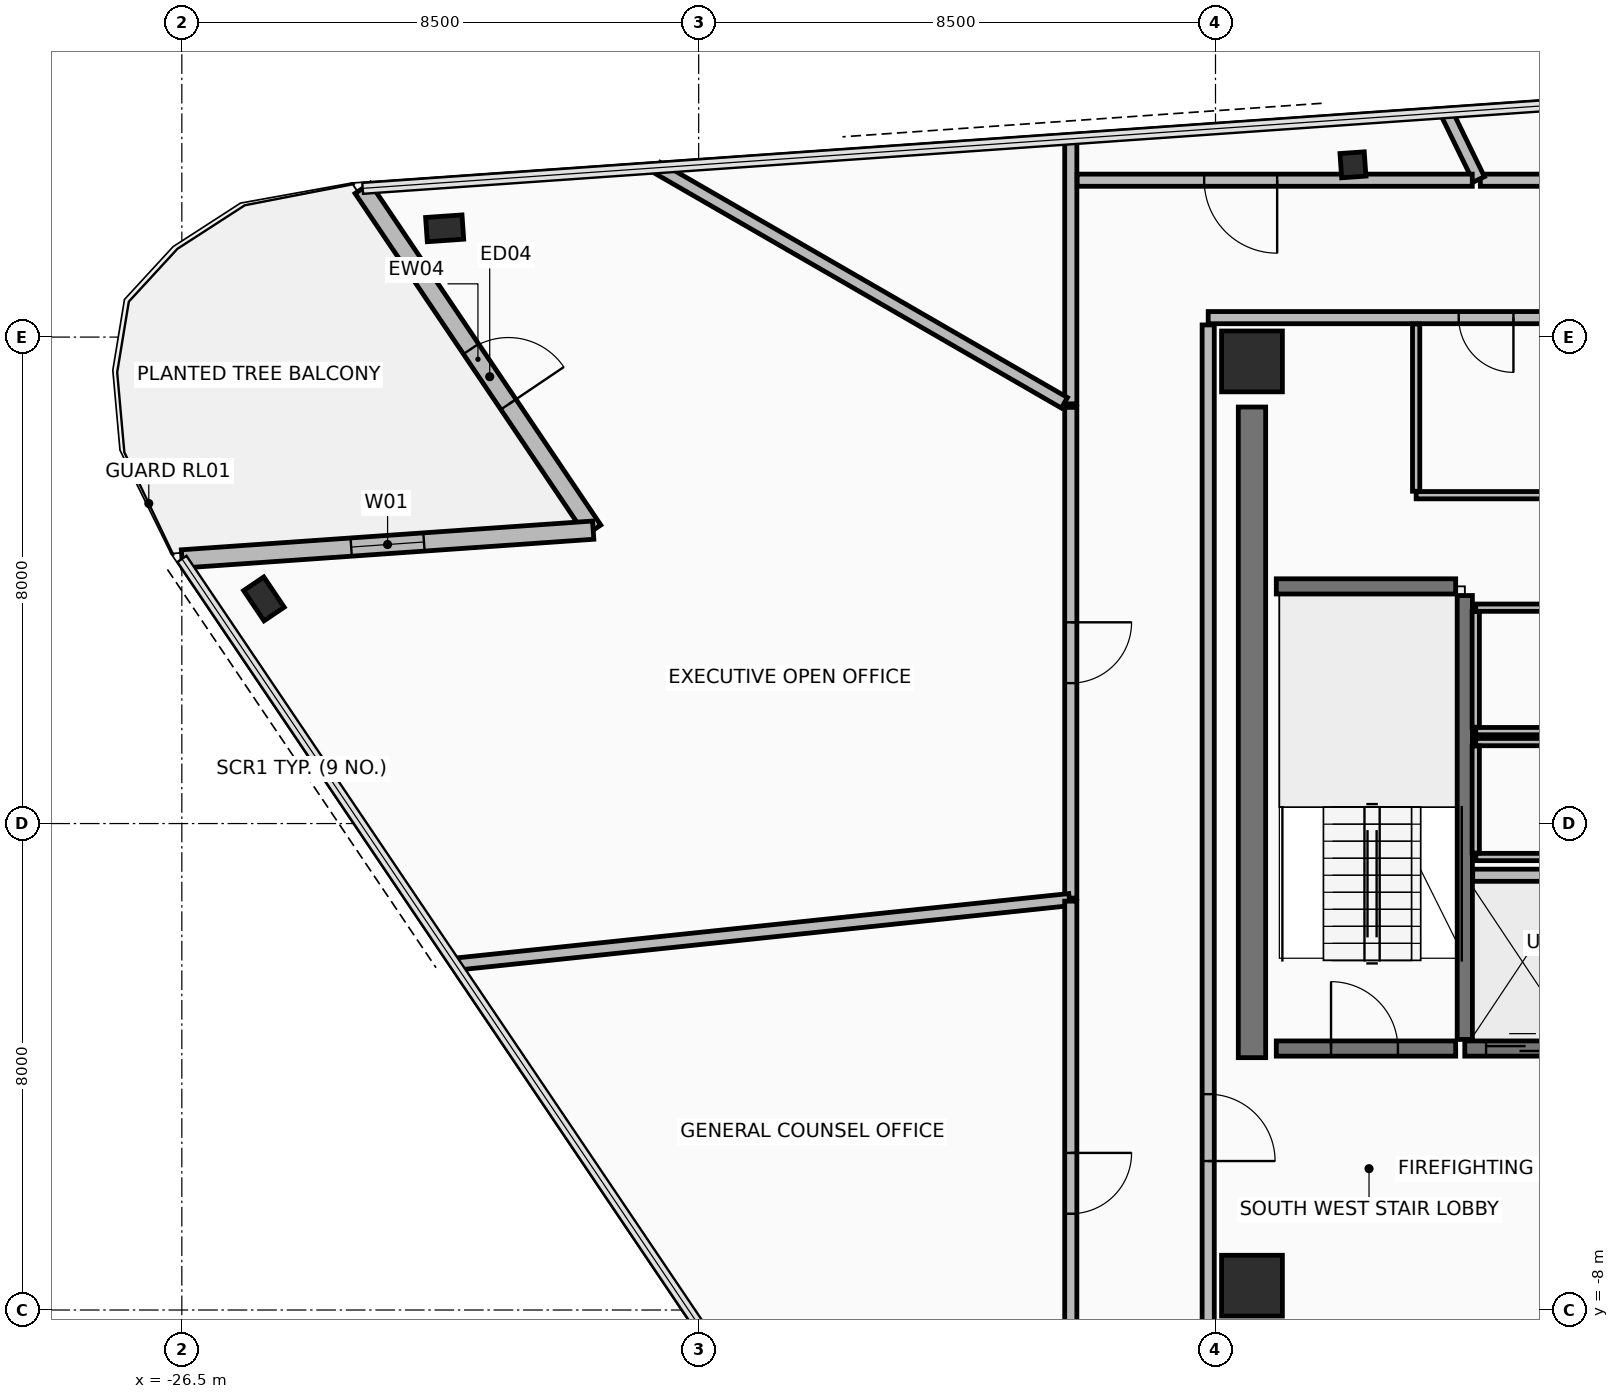
"""IFC4 building model, lengths in metres.
Left out: names, types, materials, properties, quantities, classifications, styles, units other than length and angle.
Written with IfcOpenShell. Run it as: python <this file> out.ifc"""

import sys

from ifc_helpers import new_model, si_unit, direction, frame, frame_2d, origin, origin_2d, place, context, subcontext, project, spatial, rectangle, hollow_rectangle, extrude, element, fill, save


model = new_model("IFC4")
c1 = context("Model", 3, precision=1e-05, world=origin(), true_north=direction((0.0, 1.0)))
c2 = subcontext(c1, "Body", "Model", "MODEL_VIEW")
j1 = project(units=[si_unit("LENGTHUNIT", "METRE"), si_unit("PLANEANGLEUNIT", "RADIAN")], contexts=[c1])
p1 = place(None, origin())
s1 = spatial("IfcSite", under=j1, at=p1, CompositionType="ELEMENT")
p2 = place(p1, origin())
s2 = spatial("IfcBuilding", under=s1, at=p2, CompositionType="ELEMENT")
p3 = place(p2, frame((0.0, 0.0, 260.6)))
s3 = spatial("IfcBuildingStorey", under=s2, at=p3, CompositionType="ELEMENT", Elevation=260.6)
for number, where, z_axis, x_axis in (
    (1, (-8.9, -7.6, 0.0), (0.0, 0.0, 1.0), (1.0, 0.0, 0.0)),
    (2, (-8.9, 7.6, 0.0), (0.0, 0.0, 1.0), (1.0, 0.0, 0.0)),
):
    element("IfcColumn", number, at=place(p3, frame(where, z_axis=z_axis, x_axis=x_axis)), inside=s3, PredefinedType="COLUMN", context=c2, shape_type="SweptSolid", body=[
        extrude(rectangle(XDim=1.0, YDim=1.0, at=origin_2d()), origin(), (0.0, 0.0, 1.0), 3.6),
    ])
p4 = place(p3, frame((-25.15, 3.695, 0.0), z_axis=(0.0, 0.0, 1.0), x_axis=(-0.559192903471, 0.829037572555, 0.0)))
e3 = element("IfcColumn", 3, at=p4, inside=s3, PredefinedType="COLUMN", context=c2, shape_type="SweptSolid", body=[
    extrude(hollow_rectangle(XDim=0.4, YDim=0.6, WallThickness=0.03, at=origin_2d()), origin(), (0.0, 0.0, 1.0), 3.6),
])
p5 = place(p3, frame((-7.24, 10.833, 0.0), z_axis=(0.0, 0.0, 1.0), x_axis=(0.99756392851, 0.069758214822, 0.0)))
e4 = element("IfcColumn", 4, at=p5, inside=s3, PredefinedType="COLUMN", context=c2, shape_type="SweptSolid", body=[
    extrude(hollow_rectangle(XDim=0.4, YDim=0.4, WallThickness=0.025, at=origin_2d()), origin(), (0.0, 0.0, 1.0), 3.6),
])
p6 = place(p3, frame((-22.177, 9.789, 0.0), z_axis=(0.0, 0.0, 1.0), x_axis=(0.99756392851, 0.069758214822, 0.0)))
e5 = element("IfcColumn", 5, at=p6, inside=s3, PredefinedType="COLUMN", context=c2, shape_type="SweptSolid", body=[
    extrude(hollow_rectangle(XDim=0.4, YDim=0.6, WallThickness=0.03, at=origin_2d()), origin(), (0.0, 0.0, 1.0), 3.6),
])
p7 = place(p3, frame((-23.526, 10.446, 0.0), z_axis=(0.0, 0.0, 1.0), x_axis=(0.559187716425, -0.829041071238, 0.0)))
e6 = element("IfcWall", 6, at=p7, inside=s3, PredefinedType="STANDARD", context=c2, shape_type="SweptSolid", body=[
    extrude(rectangle(XDim=6.78, YDim=0.3, at=frame_2d((3.39, 0.0))), origin(), (0.0, 0.0, 1.0), 2.765),
])
p8 = place(p7, frame((3.186, 0.0, 0.0)))
e7 = element("IfcOpeningElement", 7, at=p8, cuts=e6, PredefinedType="OPENING", context=c2, shape_type="SweptSolid", body=[
    extrude(rectangle(XDim=1.1, YDim=2.2, at=frame_2d((0.55, 1.1))), frame((0.0, 0.16, 0.0), z_axis=(0.0, -1.0, 0.0), x_axis=(1.0, 0.0, 0.0)), (0.0, 0.0, 1.0), 0.32),
])
p9 = place(p3, frame((-19.735, 4.825, 0.0), z_axis=(0.0, 0.0, 1.0), x_axis=(-0.997564507468, -0.06974993506, 0.0)))
e8 = element("IfcWall", 8, at=p9, inside=s3, PredefinedType="STANDARD", context=c2, shape_type="SweptSolid", body=[
    extrude(rectangle(XDim=6.78, YDim=0.3, at=frame_2d((3.39, 0.0))), origin(), (0.0, 0.0, 1.0), 2.765),
])
p10 = place(p9, frame((2.79, 0.0, 0.485)))
e9 = element("IfcOpeningElement", 9, at=p10, cuts=e8, PredefinedType="OPENING", context=c2, shape_type="SweptSolid", body=[
    extrude(rectangle(XDim=1.2, YDim=2.1, at=frame_2d((0.6, 1.05))), frame((0.0, 0.16, 0.0), z_axis=(0.0, -1.0, 0.0), x_axis=(1.0, 0.0, 0.0)), (0.0, 0.0, 1.0), 0.32),
])
p11 = place(p3, frame((-8.9, -3.85, 0.0), z_axis=(0.0, 0.0, 1.0), x_axis=(0.0, 1.0, 0.0)))
e10 = element("IfcWall", 10, at=p11, inside=s3, PredefinedType="SHEAR", context=c2, shape_type="SweptSolid", body=[
    extrude(rectangle(XDim=10.7, YDim=0.45, at=frame_2d((5.35, 0.0))), origin(), (0.0, 0.0, 1.0), 3.42),
])
p12 = place(p3, frame((9.62, 8.32, 0.0), z_axis=(0.0, 0.0, 1.0), x_axis=(-1.0, 0.0, 0.0)))
e11 = element("IfcWall", 11, at=p12, inside=s3, PredefinedType="PARTITIONING", context=c2, shape_type="SweptSolid", body=[
    extrude(rectangle(XDim=19.24, YDim=0.2, at=frame_2d((9.62, 0.0))), origin(), (0.0, 0.0, 1.0), 2.915),
])
p13 = place(p12, frame((8.67, 0.0, 0.0)))
e12 = element("IfcOpeningElement", 12, at=p13, cuts=e11, PredefinedType="OPENING", context=c2, shape_type="SweptSolid", body=[
    extrude(rectangle(XDim=0.9, YDim=2.1, at=frame_2d((0.45, 1.05))), frame((0.0, 0.11, 0.0), z_axis=(0.0, -1.0, 0.0), x_axis=(1.0, 0.0, 0.0)), (0.0, 0.0, 1.0), 0.22),
])
p14 = place(p12, frame((14.22, 0.0, 0.0)))
e13 = element("IfcOpeningElement", 13, at=p14, cuts=e11, PredefinedType="OPENING", context=c2, shape_type="SweptSolid", body=[
    extrude(rectangle(XDim=0.9, YDim=2.1, at=frame_2d((0.45, 1.05))), frame((0.0, 0.11, 0.0), z_axis=(0.0, -1.0, 0.0), x_axis=(1.0, 0.0, 0.0)), (0.0, 0.0, 1.0), 0.22),
])
p15 = place(p3, frame((-9.62, 8.2, 0.0), z_axis=(0.0, 0.0, 1.0), x_axis=(0.0, -1.0, 0.0)))
e14 = element("IfcWall", 14, at=p15, inside=s3, PredefinedType="PARTITIONING", context=c2, shape_type="SweptSolid", body=[
    extrude(rectangle(XDim=16.4, YDim=0.2, at=frame_2d((8.2, 0.0))), origin(), (0.0, 0.0, 1.0), 2.765),
])
p16 = place(p15, frame((12.65, 0.0, 0.0)))
e15 = element("IfcOpeningElement", 15, at=p16, cuts=e14, PredefinedType="OPENING", context=c2, shape_type="SweptSolid", body=[
    extrude(rectangle(XDim=1.1, YDim=2.15, at=frame_2d((0.55, 1.075))), frame((0.0, 0.11, 0.0), z_axis=(0.0, -1.0, 0.0), x_axis=(1.0, 0.0, 0.0)), (0.0, 0.0, 1.0), 0.22),
])
p17 = place(p3, frame((-5.4, -3.55, 0.0), z_axis=(0.0, 0.0, 1.0), x_axis=(0.0, 1.0, 0.0)))
e16 = element("IfcWall", 16, at=p17, inside=s3, PredefinedType="SHEAR", context=c2, shape_type="SweptSolid", body=[
    extrude(rectangle(XDim=7.3, YDim=0.25, at=frame_2d((3.65, 0.0))), origin(), (0.0, 0.0, 1.0), 3.42),
])
p18 = place(p3, frame((-8.5, -3.7, 0.0), z_axis=(0.0, 0.0, 1.0), x_axis=(1.0, 0.0, 0.0)))
e17 = element("IfcWall", 17, at=p18, inside=s3, PredefinedType="SHEAR", context=c2, shape_type="SweptSolid", body=[
    extrude(rectangle(XDim=2.95, YDim=0.25, at=frame_2d((1.475, 0.0))), origin(), (0.0, 0.0, 1.0), 3.42),
])
p19 = place(p18, frame((0.9, 0.0, 0.0)))
e18 = element("IfcOpeningElement", 18, at=p19, cuts=e17, PredefinedType="OPENING", context=c2, shape_type="SweptSolid", body=[
    extrude(rectangle(XDim=1.1, YDim=2.15, at=frame_2d((0.55, 1.075))), frame((0.0, 0.135, 0.0), z_axis=(0.0, -1.0, 0.0), x_axis=(1.0, 0.0, 0.0)), (0.0, 0.0, 1.0), 0.27),
])
p20 = place(p3, frame((-8.5, 3.9, 0.0), z_axis=(0.0, 0.0, 1.0), x_axis=(1.0, 0.0, 0.0)))
e19 = element("IfcWall", 19, at=p20, inside=s3, PredefinedType="SHEAR", context=c2, shape_type="SweptSolid", body=[
    extrude(rectangle(XDim=2.95, YDim=0.25, at=frame_2d((1.475, 0.0))), origin(), (0.0, 0.0, 1.0), 3.42),
])
p21 = place(p3, frame((-5.4, -3.7, 0.0), z_axis=(0.0, 0.0, 1.0), x_axis=(1.0, 0.0, 0.0)))
e20 = element("IfcWall", 20, at=p21, inside=s3, PredefinedType="SHEAR", context=c2, shape_type="SweptSolid", body=[
    extrude(rectangle(XDim=1.9, YDim=0.25, at=frame_2d((0.95, 0.0))), origin(), (0.0, 0.0, 1.0), 3.42),
])
p22 = place(p21, frame((0.35, 0.0, 0.0)))
e21 = element("IfcOpeningElement", 21, at=p22, cuts=e20, PredefinedType="OPENING", context=c2, shape_type="SweptSolid", body=[
    extrude(rectangle(XDim=1.2, YDim=2.2, at=frame_2d((0.6, 1.1))), frame((0.0, 0.135, 0.0), z_axis=(0.0, -1.0, 0.0), x_axis=(1.0, 0.0, 0.0)), (0.0, 0.0, 1.0), 0.27),
])
p23 = place(p3, frame((-5.27, -0.85, 0.0), z_axis=(0.0, 0.0, 1.0), x_axis=(1.0, 0.0, 0.0)))
e22 = element("IfcWall", 22, at=p23, inside=s3, PredefinedType="PARTITIONING", context=c2, shape_type="SweptSolid", body=[
    extrude(rectangle(XDim=1.77, YDim=0.2, at=frame_2d((0.885, 0.0))), origin(), (0.0, 0.0, 1.0), 3.42),
])
p24 = place(p3, frame((-5.22, 1.52, 0.0), z_axis=(0.0, 0.0, 1.0), x_axis=(1.0, 0.0, 0.0)))
e23 = element("IfcWall", 23, at=p24, inside=s3, PredefinedType="PARTITIONING", context=c2, shape_type="SweptSolid", body=[
    extrude(rectangle(XDim=3.47, YDim=0.12, at=frame_2d((1.735, 0.0))), origin(), (0.0, 0.0, 1.0), 3.42),
])
p25 = place(p3, frame((-1.815, 3.55, 0.0), z_axis=(0.0, 0.0, 1.0), x_axis=(-1.0, 0.0, 0.0)))
e24 = element("IfcWall", 24, at=p25, inside=s3, PredefinedType="PARTITIONING", context=c2, shape_type="SweptSolid", body=[
    extrude(rectangle(XDim=3.405, YDim=0.12, at=frame_2d((1.703, 0.0))), origin(), (0.0, 0.0, 1.0), 3.42),
])
p26 = place(p3, frame((-5.22, 3.485, 0.0), z_axis=(0.0, 0.0, 1.0), x_axis=(0.0, -1.0, 0.0)))
e25 = element("IfcWall", 25, at=p26, inside=s3, PredefinedType="PARTITIONING", context=c2, shape_type="SweptSolid", body=[
    extrude(rectangle(XDim=1.9, YDim=0.12, at=frame_2d((0.95, 0.0))), origin(), (0.0, 0.0, 1.0), 3.42),
])
p27 = place(p3, frame((-5.22, -0.55, 0.0), z_axis=(0.0, 0.0, 1.0), x_axis=(1.0, 0.0, 0.0)))
e26 = element("IfcWall", 26, at=p27, inside=s3, PredefinedType="PARTITIONING", context=c2, shape_type="SweptSolid", body=[
    extrude(rectangle(XDim=3.47, YDim=0.12, at=frame_2d((1.735, 0.0))), origin(), (0.0, 0.0, 1.0), 3.42),
])
p28 = place(p3, frame((-1.815, 1.34, 0.0), z_axis=(0.0, 0.0, 1.0), x_axis=(-1.0, 0.0, 0.0)))
e27 = element("IfcWall", 27, at=p28, inside=s3, PredefinedType="PARTITIONING", context=c2, shape_type="SweptSolid", body=[
    extrude(rectangle(XDim=3.405, YDim=0.12, at=frame_2d((1.703, 0.0))), origin(), (0.0, 0.0, 1.0), 3.42),
])
p29 = place(p3, frame((-5.22, 1.275, 0.0), z_axis=(0.0, 0.0, 1.0), x_axis=(0.0, -1.0, 0.0)))
e28 = element("IfcWall", 28, at=p29, inside=s3, PredefinedType="PARTITIONING", context=c2, shape_type="SweptSolid", body=[
    extrude(rectangle(XDim=1.76, YDim=0.12, at=frame_2d((0.88, 0.0))), origin(), (0.0, 0.0, 1.0), 3.42),
])
p30 = place(p3, frame((-6.2, 5.4, 0.0), z_axis=(0.0, 0.0, 1.0), x_axis=(1.0, 0.0, 0.0)))
e29 = element("IfcWall", 29, at=p30, inside=s3, PredefinedType="PARTITIONING", context=c2, shape_type="SweptSolid", body=[
    extrude(rectangle(XDim=2.3, YDim=0.12, at=frame_2d((1.15, 0.0))), origin(), (0.0, 0.0, 1.0), 3.42),
])
p31 = place(p3, frame((-6.2, 8.215, 0.0), z_axis=(0.0, 0.0, 1.0), x_axis=(0.0, -1.0, 0.0)))
e30 = element("IfcWall", 30, at=p31, inside=s3, PredefinedType="PARTITIONING", context=c2, shape_type="SweptSolid", body=[
    extrude(rectangle(XDim=2.75, YDim=0.12, at=frame_2d((1.375, 0.0))), origin(), (0.0, 0.0, 1.0), 2.715),
])
p32 = place(p3, frame((1.465, 10.58, 0.0), z_axis=(0.0, 0.0, 1.0), x_axis=(-1.0, 0.0, 0.0)))
e31 = element("IfcWall", 31, at=p32, inside=s3, PredefinedType="PARTITIONING", context=c2, shape_type="SweptSolid", body=[
    extrude(rectangle(XDim=6.61, YDim=0.2, at=frame_2d((3.305, 0.0))), origin(), (0.0, 0.0, 1.0), 3.42),
])
p33 = place(p32, frame((2.705, 0.0, 0.0)))
e32 = element("IfcOpeningElement", 32, at=p33, cuts=e31, PredefinedType="OPENING", context=c2, shape_type="SweptSolid", body=[
    extrude(rectangle(XDim=1.2, YDim=2.15, at=frame_2d((0.6, 1.075))), frame((0.0, 0.11, 0.0), z_axis=(0.0, -1.0, 0.0), x_axis=(1.0, 0.0, 0.0)), (0.0, 0.0, 1.0), 0.22),
])
p34 = place(p3, frame((-5.167, 10.594, 0.0), z_axis=(0.0, 0.0, 1.0), x_axis=(-0.438482667622, 0.89873964539, 0.0)))
e33 = element("IfcWall", 33, at=p34, inside=s3, PredefinedType="PARTITIONING", context=c2, shape_type="SweptSolid", body=[
    extrude(rectangle(XDim=1.222, YDim=0.2, at=frame_2d((0.611, 0.0))), origin(), (0.0, 0.0, 1.0), 2.765),
])
p35 = place(p3, frame((-11.88, 11.26, 0.0), z_axis=(0.0, 0.0, 1.0), x_axis=(0.0, -1.0, 0.0)))
e34 = element("IfcWall", 34, at=p35, inside=s3, PredefinedType="PARTITIONING", context=c2, shape_type="SweptSolid", body=[
    extrude(rectangle(XDim=4.358, YDim=0.2, at=frame_2d((2.179, 0.0))), origin(), (0.0, 0.0, 1.0), 2.765),
])
p36 = place(p3, frame((-11.985, 6.92, 0.0), z_axis=(0.0, 0.0, 1.0), x_axis=(-0.866026758741, 0.499997653139, 0.0)))
e35 = element("IfcWall", 35, at=p36, inside=s3, PredefinedType="PARTITIONING", context=c2, shape_type="SweptSolid", body=[
    extrude(rectangle(XDim=7.73, YDim=0.2, at=frame_2d((3.865, 0.0))), origin(), (0.0, 0.0, 1.0), 2.765),
])
p37 = place(p3, frame((-5.277, 10.58, 0.0), z_axis=(0.0, 0.0, 1.0), x_axis=(-1.0, 0.0, 0.0)))
e36 = element("IfcWall", 36, at=p37, inside=s3, PredefinedType="PARTITIONING", context=c2, shape_type="SweptSolid", body=[
    extrude(rectangle(XDim=6.498, YDim=0.2, at=frame_2d((3.249, 0.0))), origin(), (0.0, 0.0, 1.0), 2.765),
])
p38 = place(p37, frame((3.209, 0.0, 0.0)))
e37 = element("IfcOpeningElement", 37, at=p38, cuts=e36, PredefinedType="OPENING", context=c2, shape_type="SweptSolid", body=[
    extrude(rectangle(XDim=1.2, YDim=2.15, at=frame_2d((0.6, 1.075))), frame((0.0, 0.11, 0.0), z_axis=(0.0, -1.0, 0.0), x_axis=(1.0, 0.0, 0.0)), (0.0, 0.0, 1.0), 0.22),
])
p39 = place(p3, frame((-11.88, 6.844, 0.0), z_axis=(0.0, 0.0, 1.0), x_axis=(0.0, -1.0, 0.0)))
e38 = element("IfcWall", 38, at=p39, inside=s3, PredefinedType="PARTITIONING", context=c2, shape_type="SweptSolid", body=[
    extrude(rectangle(XDim=8.071, YDim=0.2, at=frame_2d((4.035, 0.0))), origin(), (0.0, 0.0, 1.0), 2.915),
])
p40 = place(p39, frame((3.535, 0.0, 0.0)))
e39 = element("IfcOpeningElement", 39, at=p40, cuts=e38, PredefinedType="OPENING", context=c2, shape_type="SweptSolid", body=[
    extrude(rectangle(XDim=1.0, YDim=2.15, at=frame_2d((0.5, 1.075))), frame((0.0, 0.11, 0.0), z_axis=(0.0, -1.0, 0.0), x_axis=(1.0, 0.0, 0.0)), (0.0, 0.0, 1.0), 0.22),
])
p41 = place(p3, frame((-11.902, -1.251, 0.0), z_axis=(0.0, 0.0, 1.0), x_axis=(-0.994521271801, -0.104534395947, 0.0)))
e40 = element("IfcWall", 40, at=p41, inside=s3, PredefinedType="PARTITIONING", context=c2, shape_type="SweptSolid", body=[
    extrude(rectangle(XDim=10.141, YDim=0.2, at=frame_2d((5.07, 0.0))), origin(), (0.0, 0.0, 1.0), 2.765),
])
p42 = place(p3, frame((-11.88, -1.276, 0.0), z_axis=(0.0, 0.0, 1.0), x_axis=(0.0, -1.0, 0.0)))
e41 = element("IfcWall", 41, at=p42, inside=s3, PredefinedType="PARTITIONING", context=c2, shape_type="SweptSolid", body=[
    extrude(rectangle(XDim=9.279, YDim=0.2, at=frame_2d((4.64, 0.0))), origin(), (0.0, 0.0, 1.0), 2.915),
])
p43 = place(p42, frame((4.14, 0.0, 0.0)))
e42 = element("IfcOpeningElement", 42, at=p43, cuts=e41, PredefinedType="OPENING", context=c2, shape_type="SweptSolid", body=[
    extrude(rectangle(XDim=1.0, YDim=2.15, at=frame_2d((0.5, 1.075))), frame((0.0, 0.11, 0.0), z_axis=(0.0, -1.0, 0.0), x_axis=(1.0, 0.0, 0.0)), (0.0, 0.0, 1.0), 0.22),
])
p44 = place(p8, frame((1.1, 0.0, 0.0), z_axis=(0.0, 0.0, 1.0), x_axis=(-1.0, 0.0, 0.0)))
e43 = element("IfcDoor", 43, at=p44, inside=s3, OperationType="SINGLE_SWING_LEFT", PredefinedType="DOOR", context=c2, shape_type="SweptSolid", body=[
    extrude(rectangle(XDim=1.1, YDim=2.2, at=frame_2d((0.55, 1.1))), frame((0.0, 0.025, 0.0), z_axis=(0.0, -1.0, 0.0), x_axis=(1.0, 0.0, 0.0)), (0.0, 0.0, 1.0), 0.05),
])
fill(e7, e43)
p45 = place(p10, origin())
e44 = element("IfcWindow", 44, at=p45, inside=s3, PartitioningType="SINGLE_PANEL", PredefinedType="WINDOW", context=c2, shape_type="SweptSolid", body=[
    extrude(rectangle(XDim=1.2, YDim=2.1, at=frame_2d((0.6, 1.05))), frame((0.0, 0.03, 0.0), z_axis=(0.0, -1.0, 0.0), x_axis=(1.0, 0.0, 0.0)), (0.0, 0.0, 1.0), 0.06),
])
fill(e9, e44)
p46 = place(p16, frame((1.1, 0.0, 0.0), z_axis=(0.0, 0.0, 1.0), x_axis=(-1.0, 0.0, 0.0)))
e45 = element("IfcDoor", 45, at=p46, inside=s3, OperationType="SINGLE_SWING_LEFT", PredefinedType="DOOR", context=c2, shape_type="SweptSolid", body=[
    extrude(rectangle(XDim=1.1, YDim=2.15, at=frame_2d((0.55, 1.075))), frame((0.0, 0.025, 0.0), z_axis=(0.0, -1.0, 0.0), x_axis=(1.0, 0.0, 0.0)), (0.0, 0.0, 1.0), 0.05),
])
fill(e15, e45)
p47 = place(p19, origin())
e46 = element("IfcDoor", 46, at=p47, inside=s3, OperationType="SINGLE_SWING_LEFT", PredefinedType="DOOR", context=c2, shape_type="SweptSolid", body=[
    extrude(rectangle(XDim=1.1, YDim=2.15, at=frame_2d((0.55, 1.075))), frame((0.0, 0.025, 0.0), z_axis=(0.0, -1.0, 0.0), x_axis=(1.0, 0.0, 0.0)), (0.0, 0.0, 1.0), 0.05),
])
fill(e18, e46)
p48 = place(p22, origin())
e47 = element("IfcDoor", 47, at=p48, inside=s3, OperationType="SLIDING_TO_RIGHT", PredefinedType="DOOR", context=c2, shape_type="SweptSolid", body=[
    extrude(rectangle(XDim=1.2, YDim=2.2, at=frame_2d((0.6, 1.1))), frame((0.0, 0.025, 0.0), z_axis=(0.0, -1.0, 0.0), x_axis=(1.0, 0.0, 0.0)), (0.0, 0.0, 1.0), 0.05),
])
fill(e21, e47)
p49 = place(p14, origin())
e48 = element("IfcDoor", 48, at=p49, inside=s3, OperationType="SINGLE_SWING_LEFT", PredefinedType="DOOR", context=c2, shape_type="SweptSolid", body=[
    extrude(rectangle(XDim=0.9, YDim=2.1, at=frame_2d((0.45, 1.05))), frame((0.0, 0.025, 0.0), z_axis=(0.0, -1.0, 0.0), x_axis=(1.0, 0.0, 0.0)), (0.0, 0.0, 1.0), 0.05),
])
fill(e13, e48)
p50 = place(p38, origin())
e49 = element("IfcDoor", 49, at=p50, inside=s3, OperationType="SINGLE_SWING_LEFT", PredefinedType="DOOR", context=c2, shape_type="SweptSolid", body=[
    extrude(rectangle(XDim=1.2, YDim=2.15, at=frame_2d((0.6, 1.075))), frame((0.0, 0.025, 0.0), z_axis=(0.0, -1.0, 0.0), x_axis=(1.0, 0.0, 0.0)), (0.0, 0.0, 1.0), 0.05),
])
fill(e37, e49)
p51 = place(p40, origin())
e50 = element("IfcDoor", 50, at=p51, inside=s3, OperationType="SINGLE_SWING_RIGHT", PredefinedType="DOOR", context=c2, shape_type="SweptSolid", body=[
    extrude(rectangle(XDim=1.0, YDim=2.15, at=frame_2d((0.5, 1.075))), frame((0.0, 0.025, 0.0), z_axis=(0.0, -1.0, 0.0), x_axis=(1.0, 0.0, 0.0)), (0.0, 0.0, 1.0), 0.05),
])
fill(e39, e50)
p52 = place(p43, origin())
e51 = element("IfcDoor", 51, at=p52, inside=s3, OperationType="SINGLE_SWING_RIGHT", PredefinedType="DOOR", context=c2, shape_type="SweptSolid", body=[
    extrude(rectangle(XDim=1.0, YDim=2.15, at=frame_2d((0.5, 1.075))), frame((0.0, 0.025, 0.0), z_axis=(0.0, -1.0, 0.0), x_axis=(1.0, 0.0, 0.0)), (0.0, 0.0, 1.0), 0.05),
])
fill(e42, e51)
save(model, sys.argv[1])
